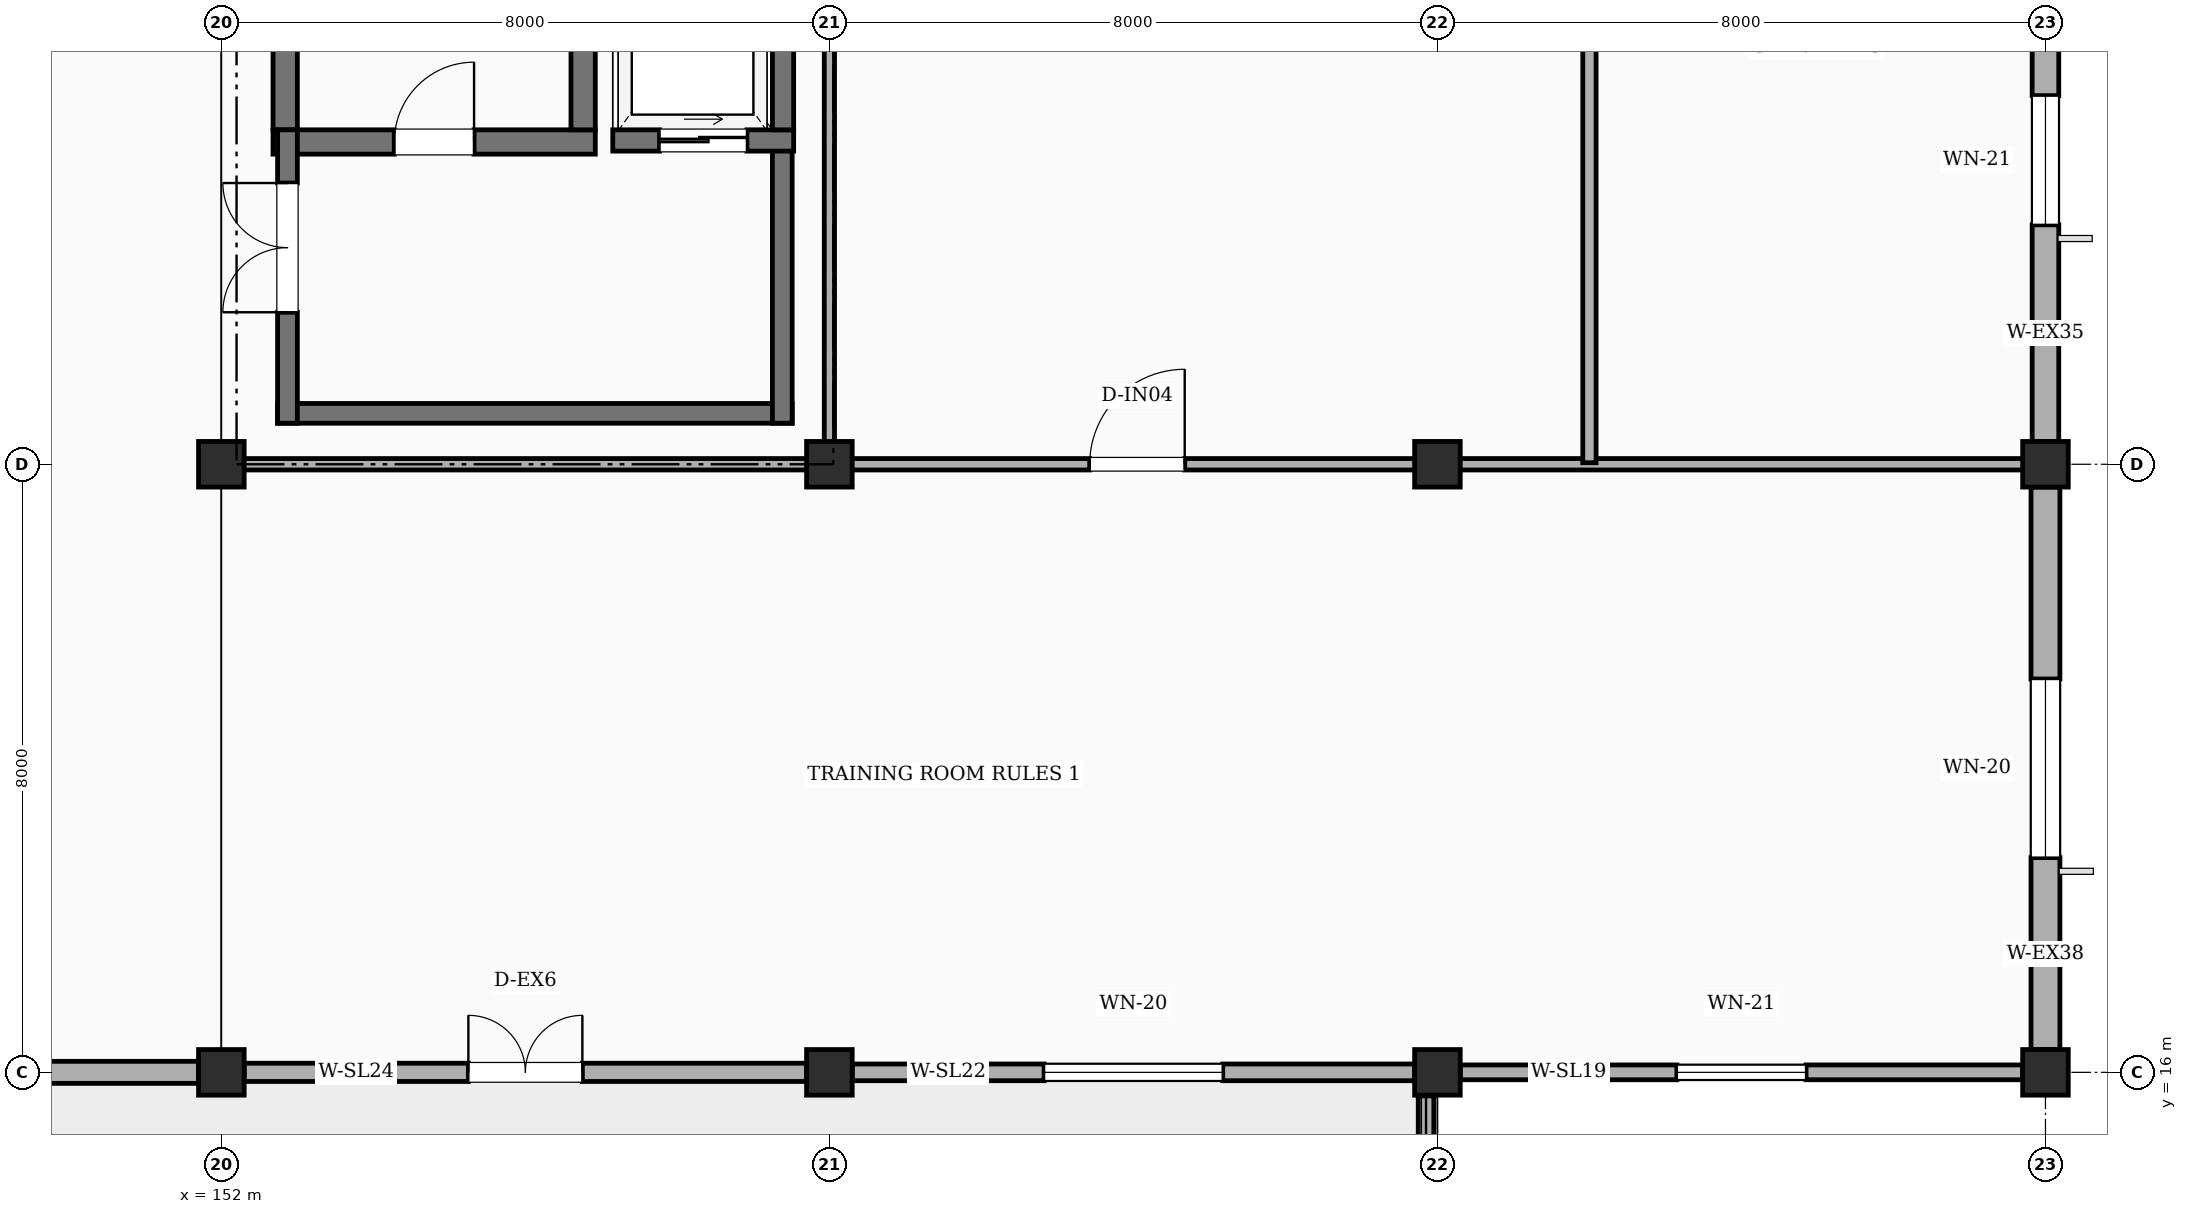
"""IFC4 building model, lengths in metres.
Left out: names, types, materials, properties, quantities, classifications, styles, units other than length and angle.
Written with IfcOpenShell. Run it as: python <this file> out.ifc"""

import sys

from ifc_helpers import new_model, si_unit, direction, frame, frame_2d, origin, origin_2d, place, context, subcontext, project, spatial, rectangle, extrude, element, fill, save


model = new_model("IFC4")
c1 = context("Model", 3, precision=1e-05, world=origin(), true_north=direction((0.0, 1.0)))
c2 = subcontext(c1, "Body", "Model", "MODEL_VIEW")
j1 = project(units=[si_unit("LENGTHUNIT", "METRE"), si_unit("PLANEANGLEUNIT", "RADIAN")], contexts=[c1])
p1 = place(None, origin())
s1 = spatial("IfcSite", under=j1, at=p1, CompositionType="ELEMENT")
p2 = place(p1, origin())
s2 = spatial("IfcBuilding", under=s1, at=p2, CompositionType="ELEMENT")
p3 = place(p2, frame((0.0, 0.0, 19.2)))
s3 = spatial("IfcBuildingStorey", under=s2, at=p3, CompositionType="ELEMENT", Elevation=19.2)
for number, where, z_axis, x_axis in (
    (1, (152.0, 16.0, 0.0), (0.0, 0.0, 1.0), (1.0, 0.0, 0.0)),
    (2, (152.0, 24.0, 0.0), (0.0, 0.0, 1.0), (1.0, 0.0, 0.0)),
    (3, (160.0, 16.0, 0.0), (0.0, 0.0, 1.0), (1.0, 0.0, 0.0)),
    (4, (160.0, 24.0, 0.0), (0.0, 0.0, 1.0), (1.0, 0.0, 0.0)),
    (5, (168.0, 16.0, 0.0), (0.0, 0.0, 1.0), (1.0, 0.0, 0.0)),
    (6, (168.0, 24.0, 0.0), (0.0, 0.0, 1.0), (1.0, 0.0, 0.0)),
    (7, (176.0, 16.0, 0.0), (0.0, 0.0, 1.0), (1.0, 0.0, 0.0)),
    (8, (176.0, 24.0, 0.0), (0.0, 0.0, 1.0), (1.0, 0.0, 0.0)),
):
    element("IfcColumn", number, at=place(p3, frame(where, z_axis=z_axis, x_axis=x_axis)), inside=s3, PredefinedType="COLUMN", context=c2, shape_type="SweptSolid", body=[
        extrude(rectangle(XDim=0.6, YDim=0.6, at=origin_2d()), origin(), (0.0, 0.0, 1.0), 4.2),
    ])
p4 = place(p3, frame((144.3, 16.0, 0.0), z_axis=(0.0, 0.0, 1.0), x_axis=(1.0, 0.0, 0.0)))
e9 = element("IfcWall", 9, at=p4, inside=s3, PredefinedType="STANDARD", context=c2, shape_type="SweptSolid", body=[
    extrude(rectangle(XDim=7.4, YDim=0.29, at=frame_2d((3.7, 0.0))), origin(), (0.0, 0.0, 1.0), 3.96),
])
p5 = place(p4, frame((2.95, 0.0, 0.0)))
e10 = element("IfcOpeningElement", 10, at=p5, cuts=e9, PredefinedType="OPENING", context=c2, shape_type="SweptSolid", body=[
    extrude(rectangle(XDim=1.5, YDim=2.25, at=frame_2d((0.75, 1.125))), frame((0.0, 0.155, 0.0), z_axis=(0.0, -1.0, 0.0), x_axis=(1.0, 0.0, 0.0)), (0.0, 0.0, 1.0), 0.31),
])
p6 = place(p3, frame((152.3, 16.0, 0.0), z_axis=(0.0, 0.0, 1.0), x_axis=(1.0, 0.0, 0.0)))
e11 = element("IfcWall", 11, at=p6, inside=s3, PredefinedType="SOLIDWALL", context=c2, shape_type="SweptSolid", body=[
    extrude(rectangle(XDim=7.4, YDim=0.24, at=frame_2d((3.7, 0.0))), origin(), (0.0, 0.0, 1.0), 3.585),
])
p7 = place(p6, frame((2.95, 0.0, 0.0)))
e12 = element("IfcOpeningElement", 12, at=p7, cuts=e11, PredefinedType="OPENING", context=c2, shape_type="SweptSolid", body=[
    extrude(rectangle(XDim=1.5, YDim=2.25, at=frame_2d((0.75, 1.125))), frame((0.0, 0.13, 0.0), z_axis=(0.0, -1.0, 0.0), x_axis=(1.0, 0.0, 0.0)), (0.0, 0.0, 1.0), 0.26),
])
p8 = place(p3, frame((160.3, 16.0, 0.0), z_axis=(0.0, 0.0, 1.0), x_axis=(1.0, 0.0, 0.0)))
e13 = element("IfcWall", 13, at=p8, inside=s3, PredefinedType="SOLIDWALL", context=c2, shape_type="SweptSolid", body=[
    extrude(rectangle(XDim=7.4, YDim=0.22, at=frame_2d((3.7, 0.0))), origin(), (0.0, 0.0, 1.0), 3.585),
])
p9 = place(p8, frame((2.525, 0.0, 0.95)))
e14 = element("IfcOpeningElement", 14, at=p9, cuts=e13, PredefinedType="OPENING", context=c2, shape_type="SweptSolid", body=[
    extrude(rectangle(XDim=2.35, YDim=1.65, at=frame_2d((1.175, 0.825))), frame((0.0, 0.12, 0.0), z_axis=(0.0, -1.0, 0.0), x_axis=(1.0, 0.0, 0.0)), (0.0, 0.0, 1.0), 0.24),
])
p10 = place(p3, frame((168.3, 16.0, 0.0), z_axis=(0.0, 0.0, 1.0), x_axis=(1.0, 0.0, 0.0)))
e15 = element("IfcWall", 15, at=p10, inside=s3, PredefinedType="SOLIDWALL", context=c2, shape_type="SweptSolid", body=[
    extrude(rectangle(XDim=7.4, YDim=0.195, at=frame_2d((3.7, 0.0))), origin(), (0.0, 0.0, 1.0), 3.58),
])
p11 = place(p10, frame((2.85, 0.0, 0.95)))
e16 = element("IfcOpeningElement", 16, at=p11, cuts=e15, PredefinedType="OPENING", context=c2, shape_type="SweptSolid", body=[
    extrude(rectangle(XDim=1.7, YDim=1.65, at=frame_2d((0.85, 0.825))), frame((0.0, 0.107, 0.0), z_axis=(0.0, -1.0, 0.0), x_axis=(1.0, 0.0, 0.0)), (0.0, 0.0, 1.0), 0.215),
])
p12 = place(p3, frame((176.0, 16.3, 0.0), z_axis=(0.0, 0.0, 1.0), x_axis=(0.0, 1.0, 0.0)))
e17 = element("IfcWall", 17, at=p12, inside=s3, PredefinedType="STANDARD", context=c2, shape_type="SweptSolid", body=[
    extrude(rectangle(XDim=7.4, YDim=0.38, at=frame_2d((3.7, 0.0))), origin(), (0.0, 0.0, 1.0), 3.58),
])
p13 = place(p12, frame((2.525, 0.0, 0.95)))
e18 = element("IfcOpeningElement", 18, at=p13, cuts=e17, PredefinedType="OPENING", context=c2, shape_type="SweptSolid", body=[
    extrude(rectangle(XDim=2.35, YDim=1.65, at=frame_2d((1.175, 0.825))), frame((0.0, 0.2, 0.0), z_axis=(0.0, -1.0, 0.0), x_axis=(1.0, 0.0, 0.0)), (0.0, 0.0, 1.0), 0.4),
])
p14 = place(p3, frame((176.0, 24.3, 0.0), z_axis=(0.0, 0.0, 1.0), x_axis=(0.0, 1.0, 0.0)))
e19 = element("IfcWall", 19, at=p14, inside=s3, PredefinedType="STANDARD", context=c2, shape_type="SweptSolid", body=[
    extrude(rectangle(XDim=7.4, YDim=0.35, at=frame_2d((3.7, 0.0))), origin(), (0.0, 0.0, 1.0), 3.57),
])
p15 = place(p14, frame((2.85, 0.0, 0.95)))
e20 = element("IfcOpeningElement", 20, at=p15, cuts=e19, PredefinedType="OPENING", context=c2, shape_type="SweptSolid", body=[
    extrude(rectangle(XDim=1.7, YDim=1.65, at=frame_2d((0.85, 0.825))), frame((0.0, 0.185, 0.0), z_axis=(0.0, -1.0, 0.0), x_axis=(1.0, 0.0, 0.0)), (0.0, 0.0, 1.0), 0.37),
])
p16 = place(p3, frame((167.85, 8.31, 0.0), z_axis=(0.0, 0.0, 1.0), x_axis=(0.0, 1.0, 0.0)))
e21 = element("IfcWall", 21, at=p16, inside=s3, PredefinedType="PARAPET", context=c2, shape_type="SweptSolid", body=[
    extrude(rectangle(XDim=7.38, YDim=0.205, at=frame_2d((3.69, 0.0))), origin(), (0.0, 0.0, 1.0), 0.42),
])
p17 = place(p3, frame((152.68, 28.24, 0.0), z_axis=(0.0, 0.0, 1.0), x_axis=(1.0, 0.0, 0.0)))
e22 = element("IfcWall", 22, at=p17, inside=s3, PredefinedType="SHEAR", context=c2, shape_type="SweptSolid", body=[
    extrude(rectangle(XDim=4.24, YDim=0.32, at=frame_2d((2.12, 0.0))), origin(), (0.0, 0.0, 1.0), 4.2),
])
p18 = place(p17, frame((1.595, 0.0, 0.0)))
e23 = element("IfcOpeningElement", 23, at=p18, cuts=e22, PredefinedType="OPENING", context=c2, shape_type="SweptSolid", body=[
    extrude(rectangle(XDim=1.05, YDim=2.15, at=frame_2d((0.525, 1.075))), frame((0.0, 0.17, 0.0), z_axis=(0.0, -1.0, 0.0), x_axis=(1.0, 0.0, 0.0)), (0.0, 0.0, 1.0), 0.34),
])
for number, where, z_axis, x_axis in (
    (24, (152.84, 28.4, 0.0), (0.0, 0.0, 1.0), (0.0, 1.0, 0.0)),
    (25, (156.76, 28.4, 0.0), (0.0, 0.0, 1.0), (0.0, 1.0, 0.0)),
):
    element("IfcWall", number, at=place(p3, frame(where, z_axis=z_axis, x_axis=x_axis)), inside=s3, PredefinedType="SHEAR", context=c2, shape_type="SweptSolid", body=[
        extrude(rectangle(XDim=8.6, YDim=0.32, at=frame_2d((4.3, 0.0))), origin(), (0.0, 0.0, 1.0), 4.2),
    ])
p19 = place(p3, frame((159.51, 24.67, 0.0), z_axis=(0.0, 0.0, 1.0), x_axis=(-1.0, 0.0, 0.0)))
e26 = element("IfcWall", 26, at=p19, inside=s3, PredefinedType="SHEAR", context=c2, shape_type="SweptSolid", body=[
    extrude(rectangle(XDim=6.77, YDim=0.26, at=frame_2d((3.385, 0.0))), origin(), (0.0, 0.0, 1.0), 4.2),
])
p20 = place(p3, frame((152.87, 24.54, 0.0), z_axis=(0.0, 0.0, 1.0), x_axis=(0.0, 1.0, 0.0)))
e27 = element("IfcWall", 27, at=p20, inside=s3, PredefinedType="SHEAR", context=c2, shape_type="SweptSolid", body=[
    extrude(rectangle(XDim=3.86, YDim=0.26, at=frame_2d((1.93, 0.0))), origin(), (0.0, 0.0, 1.0), 4.2),
])
p21 = place(p20, frame((1.46, 0.0, 0.0)))
e28 = element("IfcOpeningElement", 28, at=p21, cuts=e27, PredefinedType="OPENING", context=c2, shape_type="SweptSolid", body=[
    extrude(rectangle(XDim=1.7, YDim=2.2, at=frame_2d((0.85, 1.1))), frame((0.0, 0.14, 0.0), z_axis=(0.0, -1.0, 0.0), x_axis=(1.0, 0.0, 0.0)), (0.0, 0.0, 1.0), 0.28),
])
p22 = place(p3, frame((159.38, 24.54, 0.0), z_axis=(0.0, 0.0, 1.0), x_axis=(0.0, 1.0, 0.0)))
e29 = element("IfcWall", 29, at=p22, inside=s3, PredefinedType="SHEAR", context=c2, shape_type="SweptSolid", body=[
    extrude(rectangle(XDim=3.86, YDim=0.26, at=frame_2d((1.93, 0.0))), origin(), (0.0, 0.0, 1.0), 4.2),
])
p23 = place(p3, frame((157.15, 28.26, 0.0), z_axis=(0.0, 0.0, 1.0), x_axis=(1.0, 0.0, 0.0)))
e30 = element("IfcWall", 30, at=p23, inside=s3, PredefinedType="SHEAR", context=c2, shape_type="SweptSolid", body=[
    extrude(rectangle(XDim=2.38, YDim=0.28, at=frame_2d((1.19, 0.0))), origin(), (0.0, 0.0, 1.0), 4.2),
])
p24 = place(p23, frame((0.615, 0.0, 0.0)))
e31 = element("IfcOpeningElement", 31, at=p24, cuts=e30, PredefinedType="OPENING", context=c2, shape_type="SweptSolid", body=[
    extrude(rectangle(XDim=1.15, YDim=2.2, at=frame_2d((0.575, 1.1))), frame((0.0, 0.15, 0.0), z_axis=(0.0, -1.0, 0.0), x_axis=(1.0, 0.0, 0.0)), (0.0, 0.0, 1.0), 0.3),
])
p25 = place(p3, frame((159.39, 28.4, 0.0), z_axis=(0.0, 0.0, 1.0), x_axis=(0.0, 1.0, 0.0)))
e32 = element("IfcWall", 32, at=p25, inside=s3, PredefinedType="SHEAR", context=c2, shape_type="SweptSolid", body=[
    extrude(rectangle(XDim=2.8, YDim=0.28, at=frame_2d((1.4, 0.0))), origin(), (0.0, 0.0, 1.0), 4.2),
])
p26 = place(p3, frame((152.22, 24.0, 0.0), z_axis=(0.0, 0.0, 1.0), x_axis=(1.0, 0.0, 0.0)))
e33 = element("IfcWall", 33, at=p26, inside=s3, PredefinedType="PARTITIONING", context=c2, shape_type="SweptSolid", body=[
    extrude(rectangle(XDim=23.66, YDim=0.15, at=frame_2d((11.83, 0.0))), origin(), (0.0, 0.0, 1.0), 3.37),
])
p27 = place(p26, frame((11.205, 0.0, 0.0)))
e34 = element("IfcOpeningElement", 34, at=p27, cuts=e33, PredefinedType="OPENING", context=c2, shape_type="SweptSolid", body=[
    extrude(rectangle(XDim=1.25, YDim=2.15, at=frame_2d((0.625, 1.075))), frame((0.0, 0.085, 0.0), z_axis=(0.0, -1.0, 0.0), x_axis=(1.0, 0.0, 0.0)), (0.0, 0.0, 1.0), 0.17),
])
p28 = place(p3, frame((160.0, 24.02, 0.0), z_axis=(0.0, 0.0, 1.0), x_axis=(0.0, 1.0, 0.0)))
e35 = element("IfcWall", 35, at=p28, inside=s3, PredefinedType="PARTITIONING", context=c2, shape_type="SweptSolid", body=[
    extrude(rectangle(XDim=19.16, YDim=0.135, at=frame_2d((9.58, 0.0))), origin(), (0.0, 0.0, 1.0), 3.37),
])
p29 = place(p3, frame((170.0, 24.02, 0.0), z_axis=(0.0, 0.0, 1.0), x_axis=(0.0, 1.0, 0.0)))
e36 = element("IfcWall", 36, at=p29, inside=s3, PredefinedType="PARTITIONING", context=c2, shape_type="SweptSolid", body=[
    extrude(rectangle(XDim=23.96, YDim=0.175, at=frame_2d((11.98, 0.0))), origin(), (0.0, 0.0, 1.0), 3.37),
])
p30 = place(p29, frame((11.44, 0.0, 0.0)))
e37 = element("IfcOpeningElement", 37, at=p30, cuts=e36, PredefinedType="OPENING", context=c2, shape_type="SweptSolid", body=[
    extrude(rectangle(XDim=1.08, YDim=2.15, at=frame_2d((0.54, 1.075))), frame((0.0, 0.097, 0.0), z_axis=(0.0, -1.0, 0.0), x_axis=(1.0, 0.0, 0.0)), (0.0, 0.0, 1.0), 0.195),
])
p31 = place(p7, frame((1.5, 0.0, 0.0), z_axis=(0.0, 0.0, 1.0), x_axis=(-1.0, 0.0, 0.0)))
e38 = element("IfcDoor", 38, at=p31, inside=s3, OperationType="DOUBLE_DOOR_SINGLE_SWING", PredefinedType="DOOR", context=c2, shape_type="SweptSolid", body=[
    extrude(rectangle(XDim=1.5, YDim=2.25, at=frame_2d((-0.75, 1.125))), frame((0.0, -0.025, 0.0), z_axis=(0.0, 1.0, 0.0), x_axis=(-1.0, 0.0, 0.0)), (0.0, 0.0, 1.0), 0.05),
])
fill(e12, e38)
p32 = place(p9, origin())
e39 = element("IfcWindow", 39, at=p32, inside=s3, PartitioningType="SINGLE_PANEL", PredefinedType="WINDOW", context=c2, shape_type="SweptSolid", body=[
    extrude(rectangle(XDim=2.35, YDim=1.65, at=frame_2d((1.175, 0.825))), frame((0.0, 0.03, 0.0), z_axis=(0.0, -1.0, 0.0), x_axis=(1.0, 0.0, 0.0)), (0.0, 0.0, 1.0), 0.06),
])
fill(e14, e39)
p33 = place(p11, origin())
e40 = element("IfcWindow", 40, at=p33, inside=s3, PartitioningType="SINGLE_PANEL", PredefinedType="WINDOW", context=c2, shape_type="SweptSolid", body=[
    extrude(rectangle(XDim=1.7, YDim=1.65, at=frame_2d((0.85, 0.825))), frame((0.0, 0.03, 0.0), z_axis=(0.0, -1.0, 0.0), x_axis=(1.0, 0.0, 0.0)), (0.0, 0.0, 1.0), 0.06),
])
fill(e16, e40)
p34 = place(p13, origin())
e41 = element("IfcWindow", 41, at=p34, inside=s3, PartitioningType="SINGLE_PANEL", PredefinedType="WINDOW", context=c2, shape_type="SweptSolid", body=[
    extrude(rectangle(XDim=2.35, YDim=1.65, at=frame_2d((1.175, 0.825))), frame((0.0, 0.03, 0.0), z_axis=(0.0, -1.0, 0.0), x_axis=(1.0, 0.0, 0.0)), (0.0, 0.0, 1.0), 0.06),
])
fill(e18, e41)
p35 = place(p15, origin())
e42 = element("IfcWindow", 42, at=p35, inside=s3, PartitioningType="SINGLE_PANEL", PredefinedType="WINDOW", context=c2, shape_type="SweptSolid", body=[
    extrude(rectangle(XDim=1.7, YDim=1.65, at=frame_2d((0.85, 0.825))), frame((0.0, 0.03, 0.0), z_axis=(0.0, -1.0, 0.0), x_axis=(1.0, 0.0, 0.0)), (0.0, 0.0, 1.0), 0.06),
])
fill(e20, e42)
p36 = place(p18, origin())
e43 = element("IfcDoor", 43, at=p36, inside=s3, OperationType="SINGLE_SWING_RIGHT", PredefinedType="DOOR", context=c2, shape_type="SweptSolid", body=[
    extrude(rectangle(XDim=1.05, YDim=2.15, at=frame_2d((0.525, 1.075))), frame((0.0, 0.025, 0.0), z_axis=(0.0, -1.0, 0.0), x_axis=(1.0, 0.0, 0.0)), (0.0, 0.0, 1.0), 0.05),
])
fill(e23, e43)
p37 = place(p21, origin())
e44 = element("IfcDoor", 44, at=p37, inside=s3, OperationType="DOUBLE_DOOR_SINGLE_SWING", PredefinedType="DOOR", context=c2, shape_type="SweptSolid", body=[
    extrude(rectangle(XDim=1.7, YDim=2.2, at=frame_2d((0.85, 1.1))), frame((0.0, 0.025, 0.0), z_axis=(0.0, -1.0, 0.0), x_axis=(1.0, 0.0, 0.0)), (0.0, 0.0, 1.0), 0.05),
])
fill(e28, e44)
p38 = place(p24, origin())
e45 = element("IfcDoor", 45, at=p38, inside=s3, OperationType="SLIDING_TO_LEFT", PredefinedType="DOOR", context=c2, shape_type="SweptSolid", body=[
    extrude(rectangle(XDim=1.15, YDim=2.2, at=frame_2d((0.575, 1.1))), frame((0.0, 0.025, 0.0), z_axis=(0.0, -1.0, 0.0), x_axis=(1.0, 0.0, 0.0)), (0.0, 0.0, 1.0), 0.05),
])
fill(e31, e45)
p39 = place(p27, origin())
e46 = element("IfcDoor", 46, at=p39, inside=s3, OperationType="SINGLE_SWING_RIGHT", PredefinedType="DOOR", context=c2, shape_type="SweptSolid", body=[
    extrude(rectangle(XDim=1.25, YDim=2.15, at=frame_2d((0.625, 1.075))), frame((0.0, 0.025, 0.0), z_axis=(0.0, -1.0, 0.0), x_axis=(1.0, 0.0, 0.0)), (0.0, 0.0, 1.0), 0.05),
])
fill(e34, e46)
save(model, sys.argv[1])
